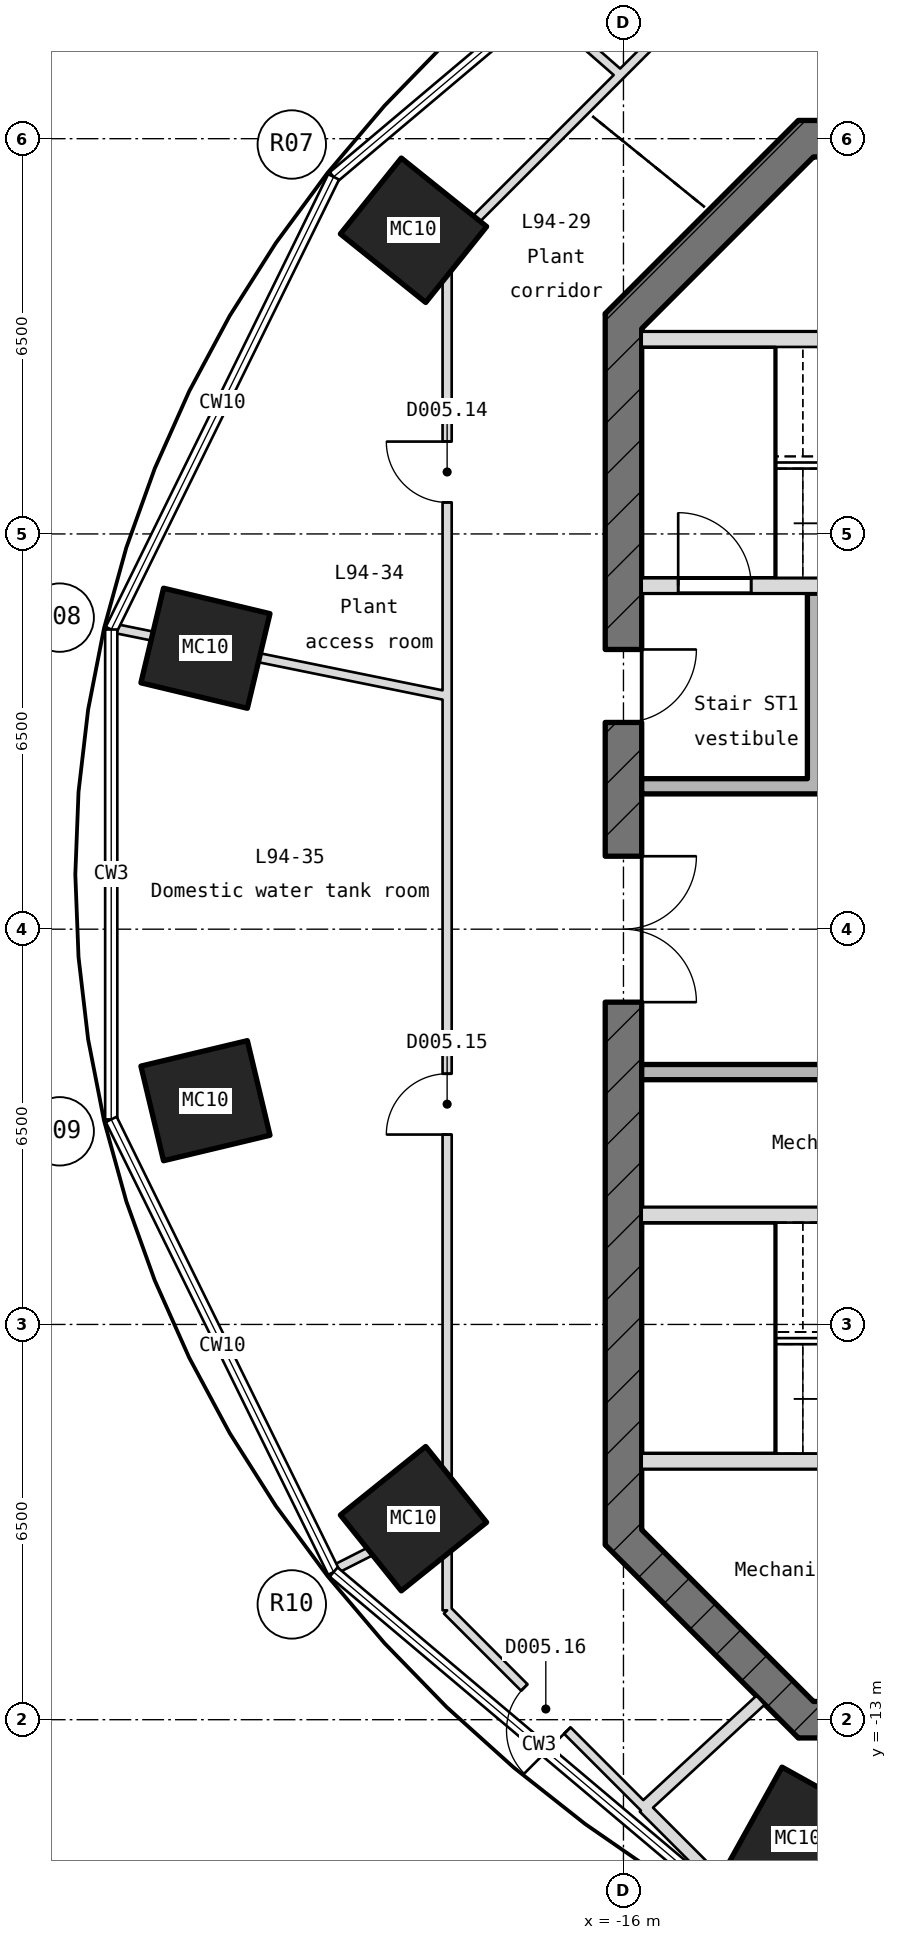
"""IFC4 building model, lengths in metres.
Left out: names, types, materials, properties, quantities, classifications, styles, units other than length and angle.
Written with IfcOpenShell. Run it as: python <this file> out.ifc"""

import sys

from ifc_helpers import new_model, si_unit, direction, frame, frame_2d, origin, origin_2d, place, context, subcontext, project, spatial, rectangle, hollow_rectangle, extrude, element, fill, save


model = new_model("IFC4")
c1 = context("Model", 3, precision=1e-05, world=origin(), true_north=direction((0.0, 1.0)))
c2 = subcontext(c1, "Body", "Model", "MODEL_VIEW")
j1 = project(units=[si_unit("LENGTHUNIT", "METRE"), si_unit("PLANEANGLEUNIT", "RADIAN")], contexts=[c1])
p1 = place(None, origin())
s1 = spatial("IfcSite", under=j1, at=p1, CompositionType="ELEMENT")
p2 = place(p1, origin())
s2 = spatial("IfcBuilding", under=s1, at=p2, CompositionType="ELEMENT")
p3 = place(p2, frame((0.0, 0.0, 418.55)))
s3 = spatial("IfcBuildingStorey", under=s2, at=p3, CompositionType="ELEMENT", Elevation=418.55)
for number, where, z_axis, x_axis in (
    (1, (-19.453, 11.494, -0.2), (0.0, 0.0, 1.0), (0.626, 0.78, 0.0)),
    (2, (-22.875, 4.62, -0.2), (0.0, 0.0, 1.0), (0.232, 0.973, 0.0)),
    (3, (-22.875, -2.82, -0.2), (0.0, 0.0, 1.0), (-0.232, 0.973, 0.0)),
    (4, (-19.453, -9.694, -0.2), (0.0, 0.0, 1.0), (-0.626, 0.78, 0.0)),
    (5, (-13.131, -14.955, -0.2), (0.0, 0.0, 1.0), (-0.874, 0.486, 0.0)),
):
    element("IfcColumn", number, at=place(p3, frame(where, z_axis=z_axis, x_axis=x_axis)), inside=s3, PredefinedType="COLUMN", context=c2, shape_type="SweptSolid", body=[
        extrude(hollow_rectangle(XDim=1.6, YDim=1.8, WallThickness=0.045, at=origin_2d()), origin(), (0.0, 0.0, 1.0), 4.9),
    ])
p4 = place(p3, frame((13.124, 13.0, -0.2), z_axis=(0.0, 0.0, 1.0), x_axis=(-1.0, 0.0, 0.0)))
e6 = element("IfcWall", 6, at=p4, inside=s3, PredefinedType="SHEAR", context=c2, shape_type="SweptSolid", body=[
    extrude(rectangle(XDim=26.249, YDim=0.6, at=frame_2d((13.124, 0.0))), origin(), (0.0, 0.0, 1.0), 4.9),
])
p5 = place(p4, frame((22.062, 0.0, 0.2)))
e7 = element("IfcOpeningElement", 7, at=p5, cuts=e6, PredefinedType="OPENING", context=c2, shape_type="SweptSolid", body=[
    extrude(rectangle(XDim=1.0, YDim=2.1, at=frame_2d((0.5, 1.05))), frame((0.0, 0.31, 0.0), z_axis=(0.0, -1.0, 0.0), x_axis=(1.0, 0.0, 0.0)), (0.0, 0.0, 1.0), 0.62),
])
p6 = place(p4, frame((15.374, 0.0, 0.2)))
e8 = element("IfcOpeningElement", 8, at=p6, cuts=e6, PredefinedType="OPENING", context=c2, shape_type="SweptSolid", body=[
    extrude(rectangle(XDim=1.0, YDim=2.1, at=frame_2d((0.5, 1.05))), frame((0.0, 0.31, 0.0), z_axis=(0.0, -1.0, 0.0), x_axis=(1.0, 0.0, 0.0)), (0.0, 0.0, 1.0), 0.62),
])
p7 = place(p4, frame((7.874, 0.0, 0.2)))
e9 = element("IfcOpeningElement", 9, at=p7, cuts=e6, PredefinedType="OPENING", context=c2, shape_type="SweptSolid", body=[
    extrude(rectangle(XDim=1.0, YDim=2.1, at=frame_2d((0.5, 1.05))), frame((0.0, 0.31, 0.0), z_axis=(0.0, -1.0, 0.0), x_axis=(1.0, 0.0, 0.0)), (0.0, 0.0, 1.0), 0.62),
])
p8 = place(p4, frame((2.4, 0.0, 0.2)))
e10 = element("IfcOpeningElement", 10, at=p8, cuts=e6, PredefinedType="OPENING", context=c2, shape_type="SweptSolid", body=[
    extrude(rectangle(XDim=1.0, YDim=2.1, at=frame_2d((0.5, 1.05))), frame((0.0, 0.31, 0.0), z_axis=(0.0, -1.0, 0.0), x_axis=(1.0, 0.0, 0.0)), (0.0, 0.0, 1.0), 0.62),
])
p9 = place(p3, frame((-12.912, 13.088, -0.2), z_axis=(0.0, 0.0, 1.0), x_axis=(-0.707106781187, -0.707106781187, 0.0)))
e11 = element("IfcWall", 11, at=p9, inside=s3, PredefinedType="SHEAR", context=c2, shape_type="SweptSolid", body=[
    extrude(rectangle(XDim=4.491, YDim=0.6, at=frame_2d((2.246, 0.0))), origin(), (0.0, 0.0, 1.0), 4.9),
])
p10 = place(p3, frame((-16.0, 10.124, -0.2), z_axis=(0.0, 0.0, 1.0), x_axis=(0.0, -1.0, 0.0)))
e12 = element("IfcWall", 12, at=p10, inside=s3, PredefinedType="SHEAR", context=c2, shape_type="SweptSolid", body=[
    extrude(rectangle(XDim=20.249, YDim=0.6, at=frame_2d((10.124, 0.0))), origin(), (0.0, 0.0, 1.0), 4.9),
])
p11 = place(p10, frame((8.924, 0.0, 0.2)))
e13 = element("IfcOpeningElement", 13, at=p11, cuts=e12, PredefinedType="OPENING", context=c2, shape_type="SweptSolid", body=[
    extrude(rectangle(XDim=2.4, YDim=2.1, at=frame_2d((1.2, 1.05))), frame((0.0, 0.31, 0.0), z_axis=(0.0, -1.0, 0.0), x_axis=(1.0, 0.0, 0.0)), (0.0, 0.0, 1.0), 0.62),
])
p12 = place(p10, frame((5.524, 0.0, 0.2)))
e14 = element("IfcOpeningElement", 14, at=p12, cuts=e12, PredefinedType="OPENING", context=c2, shape_type="SweptSolid", body=[
    extrude(rectangle(XDim=1.2, YDim=2.1, at=frame_2d((0.6, 1.05))), frame((0.0, 0.31, 0.0), z_axis=(0.0, -1.0, 0.0), x_axis=(1.0, 0.0, 0.0)), (0.0, 0.0, 1.0), 0.62),
])
p13 = place(p3, frame((-16.088, -9.912, -0.2), z_axis=(0.0, 0.0, 1.0), x_axis=(0.707106781187, -0.707106781187, 0.0)))
e15 = element("IfcWall", 15, at=p13, inside=s3, PredefinedType="SHEAR", context=c2, shape_type="SweptSolid", body=[
    extrude(rectangle(XDim=4.491, YDim=0.6, at=frame_2d((2.246, 0.0))), origin(), (0.0, 0.0, 1.0), 4.9),
])
p14 = place(p3, frame((-13.124, -13.0, -0.2), z_axis=(0.0, 0.0, 1.0), x_axis=(1.0, 0.0, 0.0)))
e16 = element("IfcWall", 16, at=p14, inside=s3, PredefinedType="SHEAR", context=c2, shape_type="SweptSolid", body=[
    extrude(rectangle(XDim=26.249, YDim=0.6, at=frame_2d((13.124, 0.0))), origin(), (0.0, 0.0, 1.0), 4.9),
])
p15 = place(p14, frame((2.824, 0.0, 0.2)))
e17 = element("IfcOpeningElement", 17, at=p15, cuts=e16, PredefinedType="OPENING", context=c2, shape_type="SweptSolid", body=[
    extrude(rectangle(XDim=1.2, YDim=2.1, at=frame_2d((0.6, 1.05))), frame((0.0, 0.31, 0.0), z_axis=(0.0, -1.0, 0.0), x_axis=(1.0, 0.0, 0.0)), (0.0, 0.0, 1.0), 0.62),
])
p16 = place(p14, frame((6.824, 0.0, 0.2)))
e18 = element("IfcOpeningElement", 18, at=p16, cuts=e16, PredefinedType="OPENING", context=c2, shape_type="SweptSolid", body=[
    extrude(rectangle(XDim=1.4, YDim=2.1, at=frame_2d((0.7, 1.05))), frame((0.0, 0.31, 0.0), z_axis=(0.0, -1.0, 0.0), x_axis=(1.0, 0.0, 0.0)), (0.0, 0.0, 1.0), 0.62),
])
p17 = place(p14, frame((15.424, 0.0, 0.2)))
e19 = element("IfcOpeningElement", 19, at=p17, cuts=e16, PredefinedType="OPENING", context=c2, shape_type="SweptSolid", body=[
    extrude(rectangle(XDim=1.4, YDim=2.1, at=frame_2d((0.7, 1.05))), frame((0.0, 0.31, 0.0), z_axis=(0.0, -1.0, 0.0), x_axis=(1.0, 0.0, 0.0)), (0.0, 0.0, 1.0), 0.62),
])
p18 = place(p3, frame((-15.7, -8.75, -0.2), z_axis=(0.0, 0.0, 1.0), x_axis=(1.0, 0.0, 0.0)))
e20 = element("IfcWall", 20, at=p18, inside=s3, PredefinedType="SHEAR", context=c2, shape_type="SweptSolid", body=[
    extrude(rectangle(XDim=7.15, YDim=0.25, at=frame_2d((3.575, 0.0))), origin(), (0.0, 0.0, 1.0), 4.9),
])
p19 = place(p18, frame((5.65, 0.0, 0.2)))
e21 = element("IfcOpeningElement", 21, at=p19, cuts=e20, PredefinedType="OPENING", context=c2, shape_type="SweptSolid", body=[
    extrude(rectangle(XDim=1.2, YDim=2.1, at=frame_2d((0.6, 1.05))), frame((0.0, 0.135, 0.0), z_axis=(0.0, -1.0, 0.0), x_axis=(1.0, 0.0, 0.0)), (0.0, 0.0, 1.0), 0.27),
])
p20 = place(p3, frame((-15.7, -4.7, -0.2), z_axis=(0.0, 0.0, 1.0), x_axis=(1.0, 0.0, 0.0)))
e22 = element("IfcWall", 22, at=p20, inside=s3, PredefinedType="SHEAR", context=c2, shape_type="SweptSolid", body=[
    extrude(rectangle(XDim=7.15, YDim=0.25, at=frame_2d((3.575, 0.0))), origin(), (0.0, 0.0, 1.0), 4.9),
])
for number, where, z_axis, x_axis in (
    (23, (-15.7, -2.35, 0.0), (0.0, 0.0, 1.0), (1.0, 0.0, 0.0)),
    (24, (-15.7, 2.35, 0.0), (0.0, 0.0, 1.0), (1.0, 0.0, 0.0)),
):
    element("IfcWall", number, at=place(p3, frame(where, z_axis=z_axis, x_axis=x_axis)), inside=s3, PredefinedType="STANDARD", context=c2, shape_type="SweptSolid", body=[
        extrude(rectangle(XDim=7.3, YDim=0.25, at=frame_2d((3.65, 0.0))), origin(), (0.0, 0.0, 1.0), 4.7),
    ])
p21 = place(p3, frame((-15.7, 5.65, -0.2), z_axis=(0.0, 0.0, 1.0), x_axis=(1.0, 0.0, 0.0)))
e25 = element("IfcWall", 25, at=p21, inside=s3, PredefinedType="SHEAR", context=c2, shape_type="SweptSolid", body=[
    extrude(rectangle(XDim=7.15, YDim=0.25, at=frame_2d((3.575, 0.0))), origin(), (0.0, 0.0, 1.0), 4.9),
])
p22 = place(p21, frame((0.6, 0.0, 0.2)))
e26 = element("IfcOpeningElement", 26, at=p22, cuts=e25, PredefinedType="OPENING", context=c2, shape_type="SweptSolid", body=[
    extrude(rectangle(XDim=1.2, YDim=2.1, at=frame_2d((0.6, 1.05))), frame((0.0, 0.135, 0.0), z_axis=(0.0, -1.0, 0.0), x_axis=(1.0, 0.0, 0.0)), (0.0, 0.0, 1.0), 0.27),
])
p23 = place(p3, frame((-15.7, 9.7, -0.2), z_axis=(0.0, 0.0, 1.0), x_axis=(1.0, 0.0, 0.0)))
e27 = element("IfcWall", 27, at=p23, inside=s3, PredefinedType="SHEAR", context=c2, shape_type="SweptSolid", body=[
    extrude(rectangle(XDim=7.15, YDim=0.25, at=frame_2d((3.575, 0.0))), origin(), (0.0, 0.0, 1.0), 4.9),
])
p24 = place(p3, frame((-12.85, 2.475, 0.0), z_axis=(0.0, 0.0, 1.0), x_axis=(0.0, 1.0, 0.0)))
e28 = element("IfcWall", 28, at=p24, inside=s3, PredefinedType="STANDARD", context=c2, shape_type="SweptSolid", body=[
    extrude(rectangle(XDim=3.05, YDim=0.25, at=frame_2d((1.525, 0.0))), origin(), (0.0, 0.0, 1.0), 4.7),
])
p25 = place(p3, frame((-20.762, -10.536, 0.0), z_axis=(0.0, 0.0, 1.0), x_axis=(0.891793061208, 0.452443516895, 0.0)))
e29 = element("IfcWall", 29, at=p25, inside=s3, PredefinedType="PARTITIONING", context=c2, shape_type="SweptSolid", body=[
    extrude(rectangle(XDim=2.088, YDim=0.15, at=frame_2d((1.044, 0.0))), origin(), (0.0, 0.0, 1.0), 4.7),
])
p26 = place(p3, frame((-18.9, 11.201, 0.0), z_axis=(0.0, 0.0, 1.0), x_axis=(0.707106781187, 0.707106781187, 0.0)))
e30 = element("IfcWall", 30, at=p26, inside=s3, PredefinedType="PARTITIONING", context=c2, shape_type="SweptSolid", body=[
    extrude(rectangle(XDim=3.998, YDim=0.15, at=frame_2d((1.999, 0.0))), origin(), (0.0, 0.0, 1.0), 4.7),
])
p27 = place(p3, frame((-16.073, 14.029, 0.0), z_axis=(0.0, 0.0, 1.0), x_axis=(0.707106781187, 0.707106781187, 0.0)))
e31 = element("IfcWall", 31, at=p27, inside=s3, PredefinedType="PARTITIONING", context=c2, shape_type="SweptSolid", body=[
    extrude(rectangle(XDim=2.646, YDim=0.15, at=frame_2d((1.323, 0.0))), origin(), (0.0, 0.0, 1.0), 4.238),
])
p28 = place(p3, frame((-18.9, -11.201, 0.0), z_axis=(0.0, 0.0, 1.0), x_axis=(0.0, 1.0, 0.0)))
e32 = element("IfcWall", 32, at=p28, inside=s3, PredefinedType="PARTITIONING", context=c2, shape_type="SweptSolid", body=[
    extrude(rectangle(XDim=22.403, YDim=0.15, at=frame_2d((11.201, 0.0))), origin(), (0.0, 0.0, 1.0), 4.7),
])
p29 = place(p28, frame((18.22, 0.0, 0.0)))
e33 = element("IfcOpeningElement", 33, at=p29, cuts=e32, PredefinedType="OPENING", context=c2, shape_type="SweptSolid", body=[
    extrude(rectangle(XDim=1.0, YDim=2.1, at=frame_2d((0.5, 1.05))), frame((0.0, 0.085, 0.0), z_axis=(0.0, -1.0, 0.0), x_axis=(1.0, 0.0, 0.0)), (0.0, 0.0, 1.0), 0.17),
])
p30 = place(p28, frame((7.824, 0.0, 0.0)))
e34 = element("IfcOpeningElement", 34, at=p30, cuts=e32, PredefinedType="OPENING", context=c2, shape_type="SweptSolid", body=[
    extrude(rectangle(XDim=1.0, YDim=2.1, at=frame_2d((0.5, 1.05))), frame((0.0, 0.085, 0.0), z_axis=(0.0, -1.0, 0.0), x_axis=(1.0, 0.0, 0.0)), (0.0, 0.0, 1.0), 0.17),
])
p31 = place(p3, frame((-15.658, -14.443, 0.0), z_axis=(0.0, 0.0, 1.0), x_axis=(-0.707080156687, 0.707133404684, 0.0)))
e35 = element("IfcWall", 35, at=p31, inside=s3, PredefinedType="PARTITIONING", context=c2, shape_type="SweptSolid", body=[
    extrude(rectangle(XDim=4.585, YDim=0.15, at=frame_2d((2.292, 0.0))), origin(), (0.0, 0.0, 1.0), 4.7),
])
p32 = place(p31, frame((1.79, 0.0, 0.0)))
e36 = element("IfcOpeningElement", 36, at=p32, cuts=e35, PredefinedType="OPENING", context=c2, shape_type="SweptSolid", body=[
    extrude(rectangle(XDim=1.0, YDim=2.1, at=frame_2d((0.5, 1.05))), frame((0.0, 0.085, 0.0), z_axis=(0.0, -1.0, 0.0), x_axis=(1.0, 0.0, 0.0)), (0.0, 0.0, 1.0), 0.17),
])
p33 = place(p3, frame((-16.051, 14.05, 0.0), z_axis=(0.0, 0.0, 1.0), x_axis=(-0.75245614782, 0.658642350299, 0.0)))
e37 = element("IfcWall", 37, at=p33, inside=s3, PredefinedType="PARTITIONING", context=c2, shape_type="SweptSolid", body=[
    extrude(rectangle(XDim=1.757, YDim=0.15, at=frame_2d((0.878, 0.0))), origin(), (0.0, 0.0, 1.0), 4.7),
])
p34 = place(p3, frame((-18.9, 3.837, 0.0), z_axis=(0.0, 0.0, 1.0), x_axis=(-0.980010753304, 0.198944523445, 0.0)))
e38 = element("IfcWall", 38, at=p34, inside=s3, PredefinedType="PARTITIONING", context=c2, shape_type="SweptSolid", body=[
    extrude(rectangle(XDim=3.651, YDim=0.15, at=frame_2d((1.825, 0.0))), origin(), (0.0, 0.0, 1.0), 4.283),
])
p35 = place(p3, frame((-22.478, 4.563, 0.0), z_axis=(0.0, 0.0, 1.0), x_axis=(-0.980028469709, 0.198857231602, 0.0)))
e39 = element("IfcWall", 39, at=p35, inside=s3, PredefinedType="PARTITIONING", context=c2, shape_type="SweptSolid", body=[
    extrude(rectangle(XDim=1.952, YDim=0.15, at=frame_2d((0.976, 0.0))), origin(), (0.0, 0.0, 1.0), 4.7),
])
p36 = place(p3, frame((-15.658, -14.443, 0.0), z_axis=(0.0, 0.0, 1.0), x_axis=(0.735008442526, 0.678057954319, 0.0)))
e40 = element("IfcWall", 40, at=p36, inside=s3, PredefinedType="PARTITIONING", context=c2, shape_type="SweptSolid", body=[
    extrude(rectangle(XDim=2.602, YDim=0.2, at=frame_2d((1.301, 0.0))), origin(), (0.0, 0.0, 1.0), 4.7),
])
p37 = place(p3, frame((-14.201, -15.9, 0.0), z_axis=(0.0, 0.0, 1.0), x_axis=(-0.707106781187, 0.707106781187, 0.0)))
e41 = element("IfcWall", 41, at=p37, inside=s3, PredefinedType="PARTITIONING", context=c2, shape_type="SweptSolid", body=[
    extrude(rectangle(XDim=2.063, YDim=0.2, at=frame_2d((1.031, 0.0))), origin(), (0.0, 0.0, 1.0), 4.7),
])
p38 = place(p22, origin())
e42 = element("IfcDoor", 42, at=p38, inside=s3, OperationType="SINGLE_SWING_RIGHT", PredefinedType="DOOR", context=c2, shape_type="SweptSolid", body=[
    extrude(rectangle(XDim=1.2, YDim=2.1, at=frame_2d((0.6, 1.05))), frame((0.0, 0.025, 0.0), z_axis=(0.0, -1.0, 0.0), x_axis=(1.0, 0.0, 0.0)), (0.0, 0.0, 1.0), 0.05),
])
fill(e26, e42)
p39 = place(p11, origin())
e43 = element("IfcDoor", 43, at=p39, inside=s3, OperationType="DOUBLE_DOOR_SINGLE_SWING", PredefinedType="DOOR", context=c2, shape_type="SweptSolid", body=[
    extrude(rectangle(XDim=2.4, YDim=2.1, at=frame_2d((1.2, 1.05))), frame((0.0, 0.025, 0.0), z_axis=(0.0, -1.0, 0.0), x_axis=(1.0, 0.0, 0.0)), (0.0, 0.0, 1.0), 0.05),
])
fill(e13, e43)
p40 = place(p12, origin())
e44 = element("IfcDoor", 44, at=p40, inside=s3, OperationType="SINGLE_SWING_RIGHT", PredefinedType="DOOR", context=c2, shape_type="SweptSolid", body=[
    extrude(rectangle(XDim=1.2, YDim=2.1, at=frame_2d((0.6, 1.05))), frame((0.0, 0.025, 0.0), z_axis=(0.0, -1.0, 0.0), x_axis=(1.0, 0.0, 0.0)), (0.0, 0.0, 1.0), 0.05),
])
fill(e14, e44)
p41 = place(p29, origin())
e45 = element("IfcDoor", 45, at=p41, inside=s3, OperationType="SINGLE_SWING_RIGHT", PredefinedType="DOOR", context=c2, shape_type="SweptSolid", body=[
    extrude(rectangle(XDim=1.0, YDim=2.1, at=frame_2d((0.5, 1.05))), frame((0.0, 0.025, 0.0), z_axis=(0.0, -1.0, 0.0), x_axis=(1.0, 0.0, 0.0)), (0.0, 0.0, 1.0), 0.05),
])
fill(e33, e45)
p42 = place(p30, origin())
e46 = element("IfcDoor", 46, at=p42, inside=s3, OperationType="SINGLE_SWING_RIGHT", PredefinedType="DOOR", context=c2, shape_type="SweptSolid", body=[
    extrude(rectangle(XDim=1.0, YDim=2.1, at=frame_2d((0.5, 1.05))), frame((0.0, 0.025, 0.0), z_axis=(0.0, -1.0, 0.0), x_axis=(1.0, 0.0, 0.0)), (0.0, 0.0, 1.0), 0.05),
])
fill(e34, e46)
p43 = place(p32, origin())
e47 = element("IfcDoor", 47, at=p43, inside=s3, OperationType="SINGLE_SWING_RIGHT", PredefinedType="DOOR", context=c2, shape_type="SweptSolid", body=[
    extrude(rectangle(XDim=1.0, YDim=2.1, at=frame_2d((0.5, 1.05))), frame((0.0, 0.025, 0.0), z_axis=(0.0, -1.0, 0.0), x_axis=(1.0, 0.0, 0.0)), (0.0, 0.0, 1.0), 0.05),
])
fill(e36, e47)
save(model, sys.argv[1])
